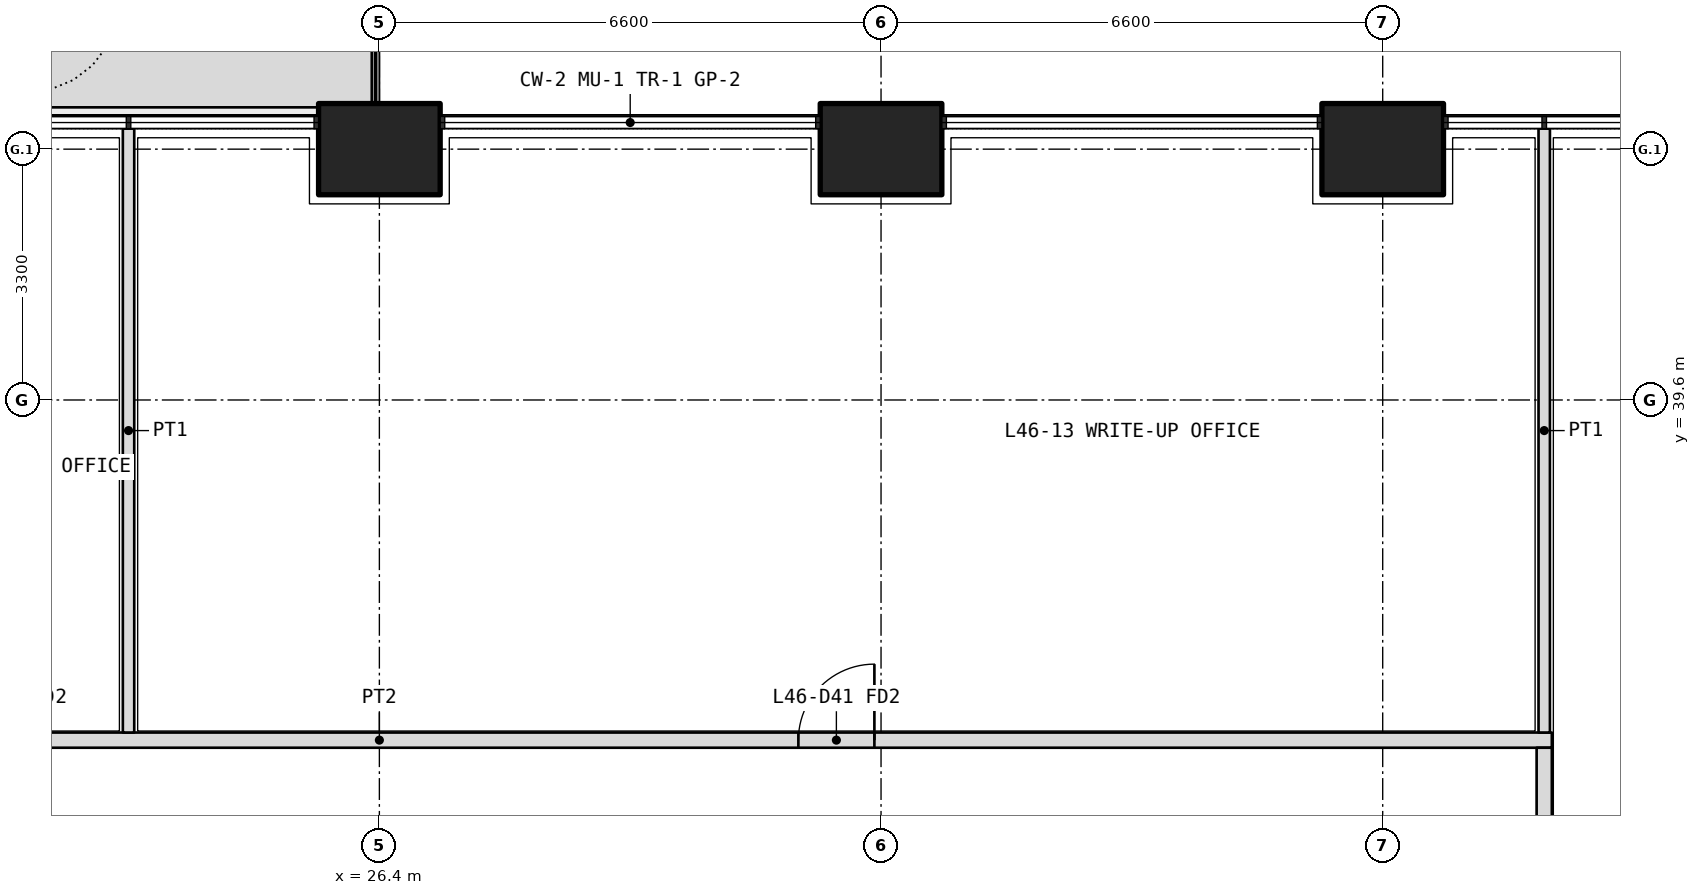
"""IFC4 building model, lengths in metres.
Left out: names, types, materials, properties, quantities, classifications, styles, units other than length and angle.
Written with IfcOpenShell. Run it as: python <this file> out.ifc"""

import sys

from ifc_helpers import new_model, si_unit, direction, frame, frame_2d, origin, origin_2d, place, context, subcontext, project, spatial, polyline, rectangle, outline, extrude, element, fill, save


model = new_model("IFC4")
c1 = context("Model", 3, precision=1e-05, world=origin(), true_north=direction((0.0, 1.0)))
c2 = subcontext(c1, "Body", "Model", "MODEL_VIEW")
j1 = project(units=[si_unit("LENGTHUNIT", "METRE"), si_unit("PLANEANGLEUNIT", "RADIAN")], contexts=[c1])
p1 = place(None, origin())
s1 = spatial("IfcSite", under=j1, at=p1, CompositionType="ELEMENT")
p2 = place(p1, origin())
s2 = spatial("IfcBuilding", under=s1, at=p2, CompositionType="ELEMENT")
p3 = place(p2, frame((0.0, 0.0, 201.9)))
s3 = spatial("IfcBuildingStorey", under=s2, at=p3, CompositionType="ELEMENT", Elevation=201.9)
for number, where, z_axis, x_axis in (
    (1, (26.4, 42.9, 0.0), (0.0, 0.0, 1.0), (1.0, 0.0, 0.0)),
    (2, (33.0, 42.9, 0.0), (0.0, 0.0, 1.0), (1.0, 0.0, 0.0)),
    (3, (39.6, 42.9, 0.0), (0.0, 0.0, 1.0), (1.0, 0.0, 0.0)),
):
    element("IfcColumn", number, at=place(p3, frame(where, z_axis=z_axis, x_axis=x_axis)), inside=s3, PredefinedType="COLUMN", context=c2, shape_type="SweptSolid", body=[
        extrude(rectangle(XDim=1.6, YDim=1.2, at=origin_2d()), origin(), (0.0, 0.0, 1.0), 4.2),
    ])
p4 = place(p3, origin())
e4 = element("IfcWall", 4, at=p4, inside=s3, PredefinedType="USERDEFINED", context=c2, shape_type="SweptSolid", body=[
    extrude(outline(polyline([(17.25, 43.45), (26.3, 43.45), (26.3, 44.45), (17.25, 44.45), (17.25, 43.45)]), holes=[polyline([(17.4, 43.6), (26.15, 43.6), (26.15, 44.3), (17.4, 44.3), (17.4, 43.6)])]), origin(), (0.0, 0.0, 1.0), 1.05),
])
p5 = place(p3, frame((10.975, 35.125, 0.0), z_axis=(0.0, 0.0, 1.0), x_axis=(1.0, 0.0, 0.0)))
e5 = element("IfcWall", 5, at=p5, inside=s3, PredefinedType="PARTITIONING", context=c2, shape_type="SweptSolid", body=[
    extrude(rectangle(XDim=30.85, YDim=0.2, at=frame_2d((15.425, 0.0))), origin(), (0.0, 0.0, 1.0), 2.85),
])
p6 = place(p5, frame((0.562, 0.0, 0.0)))
e6 = element("IfcOpeningElement", 6, at=p6, cuts=e5, PredefinedType="OPENING", context=c2, shape_type="SweptSolid", body=[
    extrude(rectangle(XDim=1.2, YDim=2.1, at=frame_2d((0.6, 1.05))), frame((0.0, 0.11, 0.0), z_axis=(0.0, -1.0, 0.0), x_axis=(1.0, 0.0, 0.0)), (0.0, 0.0, 1.0), 0.22),
])
p7 = place(p5, frame((3.425, 0.0, 0.0)))
e7 = element("IfcOpeningElement", 7, at=p7, cuts=e5, PredefinedType="OPENING", context=c2, shape_type="SweptSolid", body=[
    extrude(rectangle(XDim=1.0, YDim=2.1, at=frame_2d((0.5, 1.05))), frame((0.0, 0.11, 0.0), z_axis=(0.0, -1.0, 0.0), x_axis=(1.0, 0.0, 0.0)), (0.0, 0.0, 1.0), 0.22),
])
p8 = place(p5, frame((6.725, 0.0, 0.0)))
e8 = element("IfcOpeningElement", 8, at=p8, cuts=e5, PredefinedType="OPENING", context=c2, shape_type="SweptSolid", body=[
    extrude(rectangle(XDim=1.0, YDim=2.1, at=frame_2d((0.5, 1.05))), frame((0.0, 0.11, 0.0), z_axis=(0.0, -1.0, 0.0), x_axis=(1.0, 0.0, 0.0)), (0.0, 0.0, 1.0), 0.22),
])
p9 = place(p5, frame((9.975, 0.0, 0.0)))
e9 = element("IfcOpeningElement", 9, at=p9, cuts=e5, PredefinedType="OPENING", context=c2, shape_type="SweptSolid", body=[
    extrude(rectangle(XDim=1.0, YDim=2.1, at=frame_2d((0.5, 1.05))), frame((0.0, 0.11, 0.0), z_axis=(0.0, -1.0, 0.0), x_axis=(1.0, 0.0, 0.0)), (0.0, 0.0, 1.0), 0.22),
])
p10 = place(p5, frame((20.938, 0.0, 0.0)))
e10 = element("IfcOpeningElement", 10, at=p10, cuts=e5, PredefinedType="OPENING", context=c2, shape_type="SweptSolid", body=[
    extrude(rectangle(XDim=1.0, YDim=2.1, at=frame_2d((0.5, 1.05))), frame((0.0, 0.11, 0.0), z_axis=(0.0, -1.0, 0.0), x_axis=(1.0, 0.0, 0.0)), (0.0, 0.0, 1.0), 0.22),
])
p11 = place(p3, frame((41.725, 11.175, 0.0), z_axis=(0.0, 0.0, 1.0), x_axis=(0.0, 1.0, 0.0)))
e11 = element("IfcWall", 11, at=p11, inside=s3, PredefinedType="PARTITIONING", context=c2, shape_type="SweptSolid", body=[
    extrude(rectangle(XDim=23.85, YDim=0.2, at=frame_2d((11.925, 0.0))), origin(), (0.0, 0.0, 1.0), 2.85),
])
p12 = place(p11, frame((3.762, 0.0, 0.0)))
e12 = element("IfcOpeningElement", 12, at=p12, cuts=e11, PredefinedType="OPENING", context=c2, shape_type="SweptSolid", body=[
    extrude(rectangle(XDim=1.0, YDim=2.1, at=frame_2d((0.5, 1.05))), frame((0.0, 0.11, 0.0), z_axis=(0.0, -1.0, 0.0), x_axis=(1.0, 0.0, 0.0)), (0.0, 0.0, 1.0), 0.22),
])
p13 = place(p11, frame((9.625, 0.0, 0.0)))
e13 = element("IfcOpeningElement", 13, at=p13, cuts=e11, PredefinedType="OPENING", context=c2, shape_type="SweptSolid", body=[
    extrude(rectangle(XDim=1.0, YDim=2.1, at=frame_2d((0.5, 1.05))), frame((0.0, 0.11, 0.0), z_axis=(0.0, -1.0, 0.0), x_axis=(1.0, 0.0, 0.0)), (0.0, 0.0, 1.0), 0.22),
])
p14 = place(p11, frame((12.975, 0.0, 0.0)))
e14 = element("IfcOpeningElement", 14, at=p14, cuts=e11, PredefinedType="OPENING", context=c2, shape_type="SweptSolid", body=[
    extrude(rectangle(XDim=0.9, YDim=2.1, at=frame_2d((0.45, 1.05))), frame((0.0, 0.11, 0.0), z_axis=(0.0, -1.0, 0.0), x_axis=(1.0, 0.0, 0.0)), (0.0, 0.0, 1.0), 0.22),
])
p15 = place(p11, frame((16.275, 0.0, 0.0)))
e15 = element("IfcOpeningElement", 15, at=p15, cuts=e11, PredefinedType="OPENING", context=c2, shape_type="SweptSolid", body=[
    extrude(rectangle(XDim=1.2, YDim=2.1, at=frame_2d((0.6, 1.05))), frame((0.0, 0.11, 0.0), z_axis=(0.0, -1.0, 0.0), x_axis=(1.0, 0.0, 0.0)), (0.0, 0.0, 1.0), 0.22),
])
p16 = place(p11, frame((20.738, 0.0, 0.0)))
e16 = element("IfcOpeningElement", 16, at=p16, cuts=e11, PredefinedType="OPENING", context=c2, shape_type="SweptSolid", body=[
    extrude(rectangle(XDim=1.0, YDim=2.1, at=frame_2d((0.5, 1.05))), frame((0.0, 0.11, 0.0), z_axis=(0.0, -1.0, 0.0), x_axis=(1.0, 0.0, 0.0)), (0.0, 0.0, 1.0), 0.22),
])
for number, where, z_axis, x_axis in (
    (17, (41.725, 43.17, 0.0), (0.0, 0.0, 1.0), (0.0, -1.0, 0.0)),
    (18, (23.1, 43.17, 0.0), (0.0, 0.0, 1.0), (0.0, -1.0, 0.0)),
):
    element("IfcWall", number, at=place(p3, frame(where, z_axis=z_axis, x_axis=x_axis)), inside=s3, PredefinedType="PARTITIONING", context=c2, shape_type="SweptSolid", body=[
        extrude(rectangle(XDim=7.945, YDim=0.15, at=frame_2d((3.972, 0.0))), origin(), (0.0, 0.0, 1.0), 2.7),
    ])
p17 = place(p10, origin())
e19 = element("IfcDoor", 19, at=p17, inside=s3, OperationType="SINGLE_SWING_RIGHT", PredefinedType="DOOR", context=c2, shape_type="SweptSolid", body=[
    extrude(rectangle(XDim=1.0, YDim=2.1, at=frame_2d((0.5, 1.05))), frame((0.0, 0.025, 0.0), z_axis=(0.0, -1.0, 0.0), x_axis=(1.0, 0.0, 0.0)), (0.0, 0.0, 1.0), 0.05),
])
fill(e10, e19)
save(model, sys.argv[1])
